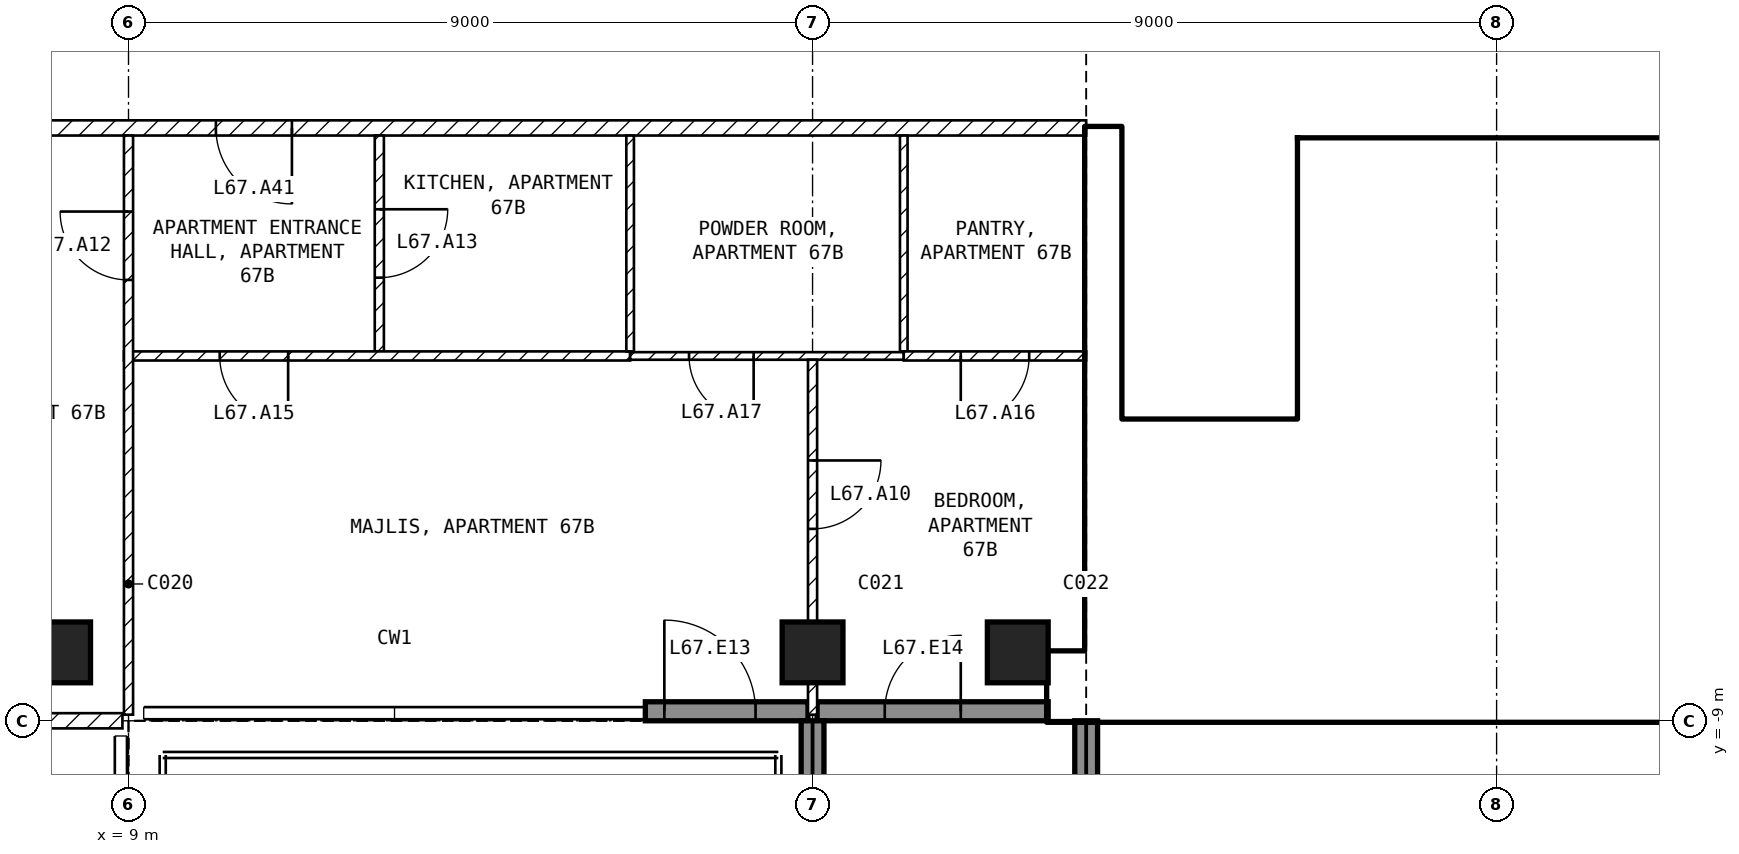
"""IFC4 building model, lengths in metres.
Left out: names, types, materials, properties, quantities, classifications, styles, units other than length and angle.
Written with IfcOpenShell. Run it as: python <this file> out.ifc"""

import sys

from ifc_helpers import new_model, si_unit, direction, frame, frame_2d, origin, origin_2d, place, context, subcontext, project, spatial, rectangle, extrude, element, fill, save


model = new_model("IFC4")
c1 = context("Model", 3, precision=1e-05, world=origin(), true_north=direction((0.0, 1.0)))
c2 = subcontext(c1, "Body", "Model", "MODEL_VIEW")
j1 = project(units=[si_unit("LENGTHUNIT", "METRE"), si_unit("PLANEANGLEUNIT", "RADIAN")], contexts=[c1])
p1 = place(None, origin())
s1 = spatial("IfcSite", under=j1, at=p1, CompositionType="ELEMENT")
p2 = place(p1, origin())
s2 = spatial("IfcBuilding", under=s1, at=p2, CompositionType="ELEMENT")
p3 = place(p2, frame((0.0, 0.0, 264.0)))
s3 = spatial("IfcBuildingStorey", under=s2, at=p3, CompositionType="ELEMENT", Elevation=264.0)
for number, where, z_axis, x_axis in (
    (1, (8.1, -8.1, -0.25), (0.0, 0.0, 1.0), (1.0, 0.0, 0.0)),
    (2, (18.0, -8.1, -0.25), (0.0, 0.0, 1.0), (1.0, 0.0, 0.0)),
    (3, (20.7, -8.1, -0.25), (0.0, 0.0, 1.0), (1.0, 0.0, 0.0)),
):
    element("IfcColumn", number, at=place(p3, frame(where, z_axis=z_axis, x_axis=x_axis)), inside=s3, PredefinedType="COLUMN", context=c2, shape_type="SweptSolid", body=[
        extrude(rectangle(XDim=0.8, YDim=0.8, at=origin_2d()), origin(), (0.0, 0.0, 1.0), 3.5),
    ])
p4 = place(p3, frame((15.8, -8.875, 0.0), z_axis=(0.0, 0.0, 1.0), x_axis=(1.0, 0.0, 0.0)))
e4 = element("IfcWall", 4, at=p4, inside=s3, PredefinedType="SOLIDWALL", context=c2, shape_type="SweptSolid", body=[
    extrude(rectangle(XDim=2.14, YDim=0.25, at=frame_2d((1.07, 0.0))), origin(), (0.0, 0.0, 1.0), 3.25),
])
p5 = place(p4, frame((0.25, 0.0, 0.0)))
e5 = element("IfcOpeningElement", 5, at=p5, cuts=e4, PredefinedType="OPENING", context=c2, shape_type="SweptSolid", body=[
    extrude(rectangle(XDim=1.2, YDim=2.4, at=frame_2d((0.6, 1.2))), frame((0.0, 0.135, 0.0), z_axis=(0.0, -1.0, 0.0), x_axis=(1.0, 0.0, 0.0)), (0.0, 0.0, 1.0), 0.27),
])
p6 = place(p3, frame((18.06, -8.875, 0.0), z_axis=(0.0, 0.0, 1.0), x_axis=(1.0, 0.0, 0.0)))
e6 = element("IfcWall", 6, at=p6, inside=s3, PredefinedType="SOLIDWALL", context=c2, shape_type="SweptSolid", body=[
    extrude(rectangle(XDim=3.04, YDim=0.25, at=frame_2d((1.52, 0.0))), origin(), (0.0, 0.0, 1.0), 3.25),
])
p7 = place(p6, frame((0.89, 0.0, 0.0)))
e7 = element("IfcOpeningElement", 7, at=p7, cuts=e6, PredefinedType="OPENING", context=c2, shape_type="SweptSolid", body=[
    extrude(rectangle(XDim=1.0, YDim=2.4, at=frame_2d((0.5, 1.2))), frame((0.0, 0.135, 0.0), z_axis=(0.0, -1.0, 0.0), x_axis=(1.0, 0.0, 0.0)), (0.0, 0.0, 1.0), 0.27),
])
p8 = place(p3, frame((18.0, -9.0, 0.0), z_axis=(0.0, 0.0, 1.0), x_axis=(0.0, -1.0, 0.0)))
e8 = element("IfcWall", 8, at=p8, inside=s3, PredefinedType="SOLIDWALL", context=c2, shape_type="SweptSolid", body=[
    extrude(rectangle(XDim=2.74, YDim=0.3, at=frame_2d((1.37, 0.0))), origin(), (0.0, 0.0, 1.0), 3.25),
])
p9 = place(p3, frame((21.6, -9.0, 0.0), z_axis=(0.0, 0.0, 1.0), x_axis=(0.0, -1.0, 0.0)))
e9 = element("IfcWall", 9, at=p9, inside=s3, PredefinedType="SOLIDWALL", context=c2, shape_type="SweptSolid", body=[
    extrude(rectangle(XDim=2.7, YDim=0.3, at=frame_2d((1.35, 0.0))), origin(), (0.0, 0.0, 1.0), 3.25),
])
p10 = place(p3, frame((21.1, -8.55, 0.0), z_axis=(0.0, 0.0, 1.0), x_axis=(1.0, 0.0, 0.0)))
e10 = element("IfcWall", 10, at=p10, inside=s3, PredefinedType="SHEAR", context=c2, shape_type="SweptSolid", body=[
    extrude(rectangle(XDim=9.1, YDim=0.9, at=frame_2d((4.55, 0.0))), origin(), (0.0, 0.0, 1.0), 3.25),
])
p11 = place(p3, frame((21.825, -8.1, 0.0), z_axis=(0.0, 0.0, 1.0), x_axis=(0.0, 1.0, 0.0)))
e11 = element("IfcWall", 11, at=p11, inside=s3, PredefinedType="SHEAR", context=c2, shape_type="SweptSolid", body=[
    extrude(rectangle(XDim=6.9, YDim=0.45, at=frame_2d((3.45, 0.0))), origin(), (0.0, 0.0, 1.0), 3.25),
])
p12 = place(p3, frame((24.5, -5.05, 0.0), z_axis=(0.0, 0.0, 1.0), x_axis=(0.0, 1.0, 0.0)))
e12 = element("IfcWall", 12, at=p12, inside=s3, PredefinedType="SOLIDWALL", context=c2, shape_type="SweptSolid", body=[
    extrude(rectangle(XDim=3.7, YDim=0.2, at=frame_2d((1.85, 0.0))), origin(), (0.0, 0.0, 1.0), 3.25),
])
p13 = place(p12, frame((0.1, 0.0, 0.0)))
e13 = element("IfcOpeningElement", 13, at=p13, cuts=e12, PredefinedType="OPENING", context=c2, shape_type="SweptSolid", body=[
    extrude(rectangle(XDim=0.8, YDim=2.1, at=frame_2d((0.4, 1.05))), frame((0.0, 0.11, 0.0), z_axis=(0.0, -1.0, 0.0), x_axis=(1.0, 0.0, 0.0)), (0.0, 0.0, 1.0), 0.22),
])
p14 = place(p3, frame((22.05, -5.15, 0.0), z_axis=(0.0, 0.0, 1.0), x_axis=(1.0, 0.0, 0.0)))
e14 = element("IfcWall", 14, at=p14, inside=s3, PredefinedType="SOLIDWALL", context=c2, shape_type="SweptSolid", body=[
    extrude(rectangle(XDim=6.3, YDim=0.2, at=frame_2d((3.15, 0.0))), origin(), (0.0, 0.0, 1.0), 3.25),
])
p15 = place(p14, frame((0.2, 0.0, 0.0)))
e15 = element("IfcOpeningElement", 15, at=p15, cuts=e14, PredefinedType="OPENING", context=c2, shape_type="SweptSolid", body=[
    extrude(rectangle(XDim=1.0, YDim=2.1, at=frame_2d((0.5, 1.05))), frame((0.0, 0.11, 0.0), z_axis=(0.0, -1.0, 0.0), x_axis=(1.0, 0.0, 0.0)), (0.0, 0.0, 1.0), 0.22),
])
p16 = place(p3, frame((28.25, -8.1, 0.0), z_axis=(0.0, 0.0, 1.0), x_axis=(0.0, 1.0, 0.0)))
e16 = element("IfcWall", 16, at=p16, inside=s3, PredefinedType="SOLIDWALL", context=c2, shape_type="SweptSolid", body=[
    extrude(rectangle(XDim=2.85, YDim=0.2, at=frame_2d((1.425, 0.0))), origin(), (0.0, 0.0, 1.0), 3.25),
])
p17 = place(p3, frame((24.6, -1.45, 0.0), z_axis=(0.0, 0.0, 1.0), x_axis=(1.0, 0.0, 0.0)))
e17 = element("IfcWall", 17, at=p17, inside=s3, PredefinedType="SOLIDWALL", context=c2, shape_type="SweptSolid", body=[
    extrude(rectangle(XDim=8.75, YDim=0.2, at=frame_2d((4.375, 0.0))), origin(), (0.0, 0.0, 1.0), 3.25),
])
p18 = place(p17, frame((0.4, 0.0, 0.0)))
e18 = element("IfcOpeningElement", 18, at=p18, cuts=e17, PredefinedType="OPENING", context=c2, shape_type="SweptSolid", body=[
    extrude(rectangle(XDim=1.0, YDim=2.1, at=frame_2d((0.5, 1.05))), frame((0.0, 0.11, 0.0), z_axis=(0.0, -1.0, 0.0), x_axis=(1.0, 0.0, 0.0)), (0.0, 0.0, 1.0), 0.22),
])
p19 = place(p17, frame((2.4, 0.0, 0.0)))
e19 = element("IfcOpeningElement", 19, at=p19, cuts=e17, PredefinedType="OPENING", context=c2, shape_type="SweptSolid", body=[
    extrude(rectangle(XDim=1.0, YDim=2.1, at=frame_2d((0.5, 1.05))), frame((0.0, 0.11, 0.0), z_axis=(0.0, -1.0, 0.0), x_axis=(1.0, 0.0, 0.0)), (0.0, 0.0, 1.0), 0.22),
])
p20 = place(p17, frame((4.4, 0.0, 0.0)))
e20 = element("IfcOpeningElement", 20, at=p20, cuts=e17, PredefinedType="OPENING", context=c2, shape_type="SweptSolid", body=[
    extrude(rectangle(XDim=1.0, YDim=2.1, at=frame_2d((0.5, 1.05))), frame((0.0, 0.11, 0.0), z_axis=(0.0, -1.0, 0.0), x_axis=(1.0, 0.0, 0.0)), (0.0, 0.0, 1.0), 0.22),
])
p21 = place(p17, frame((6.925, 0.0, 0.0)))
e21 = element("IfcOpeningElement", 21, at=p21, cuts=e17, PredefinedType="OPENING", context=c2, shape_type="SweptSolid", body=[
    extrude(rectangle(XDim=0.9, YDim=2.1, at=frame_2d((0.45, 1.05))), frame((0.0, 0.11, 0.0), z_axis=(0.0, -1.0, 0.0), x_axis=(1.0, 0.0, 0.0)), (0.0, 0.0, 1.0), 0.22),
])
p22 = place(p3, frame((24.6, -3.95, 0.0), z_axis=(0.0, 0.0, 1.0), x_axis=(1.0, 0.0, 0.0)))
e22 = element("IfcWall", 22, at=p22, inside=s3, PredefinedType="SOLIDWALL", context=c2, shape_type="SweptSolid", body=[
    extrude(rectangle(XDim=8.75, YDim=0.2, at=frame_2d((4.375, 0.0))), origin(), (0.0, 0.0, 1.0), 3.25),
])
for number, where, z_axis, x_axis in (
    (23, (26.5, -3.85, 0.0), (0.0, 0.0, 1.0), (0.0, 1.0, 0.0)),
    (24, (28.5, -3.85, 0.0), (0.0, 0.0, 1.0), (0.0, 1.0, 0.0)),
):
    element("IfcWall", number, at=place(p3, frame(where, z_axis=z_axis, x_axis=x_axis)), inside=s3, PredefinedType="SOLIDWALL", context=c2, shape_type="SweptSolid", body=[
        extrude(rectangle(XDim=2.3, YDim=0.2, at=frame_2d((1.15, 0.0))), origin(), (0.0, 0.0, 1.0), 3.25),
    ])
p23 = place(p3, frame((27.4, -5.05, 0.0), z_axis=(0.0, 0.0, 1.0), x_axis=(0.0, 1.0, 0.0)))
e25 = element("IfcWall", 25, at=p23, inside=s3, PredefinedType="PARTITIONING", context=c2, shape_type="SweptSolid", body=[
    extrude(rectangle(XDim=1.0, YDim=0.15, at=frame_2d((0.5, 0.0))), origin(), (0.0, 0.0, 1.0), 3.25),
])
p24 = place(p23, frame((0.1, 0.0, 0.0)))
e26 = element("IfcOpeningElement", 26, at=p24, cuts=e25, PredefinedType="OPENING", context=c2, shape_type="SweptSolid", body=[
    extrude(rectangle(XDim=0.8, YDim=2.1, at=frame_2d((0.4, 1.05))), frame((0.0, 0.085, 0.0), z_axis=(0.0, -1.0, 0.0), x_axis=(1.0, 0.0, 0.0)), (0.0, 0.0, 1.0), 0.17),
])
p25 = place(p3, frame((21.6, -1.2, 0.0), z_axis=(0.0, 0.0, 1.0), x_axis=(-1.0, 0.0, 0.0)))
e27 = element("IfcWall", 27, at=p25, inside=s3, PredefinedType="PARTITIONING", context=c2, shape_type="SweptSolid", body=[
    extrude(rectangle(XDim=17.2, YDim=0.2, at=frame_2d((8.6, 0.0))), origin(), (0.0, 0.0, 1.0), 3.25),
])
p26 = place(p25, frame((10.45, 0.0, 0.0)))
e28 = element("IfcOpeningElement", 28, at=p26, cuts=e27, PredefinedType="OPENING", context=c2, shape_type="SweptSolid", body=[
    extrude(rectangle(XDim=1.0, YDim=2.1, at=frame_2d((0.5, 1.05))), frame((0.0, 0.11, 0.0), z_axis=(0.0, -1.0, 0.0), x_axis=(1.0, 0.0, 0.0)), (0.0, 0.0, 1.0), 0.22),
])
p27 = place(p3, frame((8.92, -9.0, 0.0), z_axis=(0.0, 0.0, 1.0), x_axis=(-1.0, 0.0, 0.0)))
e29 = element("IfcWall", 29, at=p27, inside=s3, PredefinedType="PARTITIONING", context=c2, shape_type="SweptSolid", body=[
    extrude(rectangle(XDim=17.84, YDim=0.2, at=frame_2d((8.92, 0.0))), origin(), (0.0, 0.0, 1.0), 3.25),
])
p28 = place(p27, frame((8.42, 0.0, 0.0)))
e30 = element("IfcOpeningElement", 30, at=p28, cuts=e29, PredefinedType="OPENING", context=c2, shape_type="SweptSolid", body=[
    extrude(rectangle(XDim=1.0, YDim=2.1, at=frame_2d((0.5, 1.05))), frame((0.0, 0.11, 0.0), z_axis=(0.0, -1.0, 0.0), x_axis=(1.0, 0.0, 0.0)), (0.0, 0.0, 1.0), 0.22),
])
p29 = place(p3, frame((12.3, -1.3, 0.0), z_axis=(0.0, 0.0, 1.0), x_axis=(0.0, -1.0, 0.0)))
e31 = element("IfcWall", 31, at=p29, inside=s3, PredefinedType="PARTITIONING", context=c2, shape_type="SweptSolid", body=[
    extrude(rectangle(XDim=2.84, YDim=0.12, at=frame_2d((1.42, 0.0))), origin(), (0.0, 0.0, 1.0), 3.25),
])
p30 = place(p29, frame((0.97, 0.0, 0.0)))
e32 = element("IfcOpeningElement", 32, at=p30, cuts=e31, PredefinedType="OPENING", context=c2, shape_type="SweptSolid", body=[
    extrude(rectangle(XDim=0.9, YDim=2.1, at=frame_2d((0.45, 1.05))), frame((0.0, 0.07, 0.0), z_axis=(0.0, -1.0, 0.0), x_axis=(1.0, 0.0, 0.0)), (0.0, 0.0, 1.0), 0.14),
])
p31 = place(p3, frame((15.6, -4.2, 0.0), z_axis=(0.0, 0.0, 1.0), x_axis=(-1.0, 0.0, 0.0)))
e33 = element("IfcWall", 33, at=p31, inside=s3, PredefinedType="PARTITIONING", context=c2, shape_type="SweptSolid", body=[
    extrude(rectangle(XDim=6.66, YDim=0.12, at=frame_2d((3.33, 0.0))), origin(), (0.0, 0.0, 1.0), 3.25),
])
p32 = place(p31, frame((4.5, 0.0, 0.0)))
e34 = element("IfcOpeningElement", 34, at=p32, cuts=e33, PredefinedType="OPENING", context=c2, shape_type="SweptSolid", body=[
    extrude(rectangle(XDim=0.9, YDim=2.1, at=frame_2d((0.45, 1.05))), frame((0.0, 0.07, 0.0), z_axis=(0.0, -1.0, 0.0), x_axis=(1.0, 0.0, 0.0)), (0.0, 0.0, 1.0), 0.14),
])
p33 = place(p3, frame((9.0, -8.92, 0.0), z_axis=(0.0, 0.0, 1.0), x_axis=(0.0, 1.0, 0.0)))
e35 = element("IfcWall", 35, at=p33, inside=s3, PredefinedType="PARTITIONING", context=c2, shape_type="SweptSolid", body=[
    extrude(rectangle(XDim=7.62, YDim=0.12, at=frame_2d((3.81, 0.0))), origin(), (0.0, 0.0, 1.0), 3.25),
])
p34 = place(p33, frame((5.72, 0.0, 0.0)))
e36 = element("IfcOpeningElement", 36, at=p34, cuts=e35, PredefinedType="OPENING", context=c2, shape_type="SweptSolid", body=[
    extrude(rectangle(XDim=0.9, YDim=2.1, at=frame_2d((0.45, 1.05))), frame((0.0, 0.07, 0.0), z_axis=(0.0, -1.0, 0.0), x_axis=(1.0, 0.0, 0.0)), (0.0, 0.0, 1.0), 0.14),
])
for number, where, z_axis, x_axis in (
    (37, (15.6, -1.3, 0.0), (0.0, 0.0, 1.0), (0.0, -1.0, 0.0)),
    (38, (19.2, -1.3, 0.0), (0.0, 0.0, 1.0), (0.0, -1.0, 0.0)),
):
    element("IfcWall", number, at=place(p3, frame(where, z_axis=z_axis, x_axis=x_axis)), inside=s3, PredefinedType="PARTITIONING", context=c2, shape_type="SweptSolid", body=[
        extrude(rectangle(XDim=2.84, YDim=0.1, at=frame_2d((1.42, 0.0))), origin(), (0.0, 0.0, 1.0), 3.25),
    ])
p35 = place(p3, frame((19.2, -4.2, 0.0), z_axis=(0.0, 0.0, 1.0), x_axis=(-1.0, 0.0, 0.0)))
e39 = element("IfcWall", 39, at=p35, inside=s3, PredefinedType="PARTITIONING", context=c2, shape_type="SweptSolid", body=[
    extrude(rectangle(XDim=3.6, YDim=0.1, at=frame_2d((1.8, 0.0))), origin(), (0.0, 0.0, 1.0), 3.25),
])
p36 = place(p35, frame((1.975, 0.0, 0.0)))
e40 = element("IfcOpeningElement", 40, at=p36, cuts=e39, PredefinedType="OPENING", context=c2, shape_type="SweptSolid", body=[
    extrude(rectangle(XDim=0.85, YDim=2.1, at=frame_2d((0.425, 1.05))), frame((0.0, 0.06, 0.0), z_axis=(0.0, -1.0, 0.0), x_axis=(1.0, 0.0, 0.0)), (0.0, 0.0, 1.0), 0.12),
])
p37 = place(p3, frame((21.6, -4.2, 0.0), z_axis=(0.0, 0.0, 1.0), x_axis=(-1.0, 0.0, 0.0)))
e41 = element("IfcWall", 41, at=p37, inside=s3, PredefinedType="PARTITIONING", context=c2, shape_type="SweptSolid", body=[
    extrude(rectangle(XDim=2.4, YDim=0.12, at=frame_2d((1.2, 0.0))), origin(), (0.0, 0.0, 1.0), 3.25),
])
p38 = place(p37, frame((0.75, 0.0, 0.0)))
e42 = element("IfcOpeningElement", 42, at=p38, cuts=e41, PredefinedType="OPENING", context=c2, shape_type="SweptSolid", body=[
    extrude(rectangle(XDim=0.9, YDim=2.1, at=frame_2d((0.45, 1.05))), frame((0.0, 0.07, 0.0), z_axis=(0.0, -1.0, 0.0), x_axis=(1.0, 0.0, 0.0)), (0.0, 0.0, 1.0), 0.14),
])
p39 = place(p3, frame((18.0, -4.25, 0.0), z_axis=(0.0, 0.0, 1.0), x_axis=(0.0, -1.0, 0.0)))
e43 = element("IfcWall", 43, at=p39, inside=s3, PredefinedType="PARTITIONING", context=c2, shape_type="SweptSolid", body=[
    extrude(rectangle(XDim=4.67, YDim=0.12, at=frame_2d((2.335, 0.0))), origin(), (0.0, 0.0, 1.0), 2.496),
])
p40 = place(p39, frame((1.325, 0.0, 0.0)))
e44 = element("IfcOpeningElement", 44, at=p40, cuts=e43, PredefinedType="OPENING", context=c2, shape_type="SweptSolid", body=[
    extrude(rectangle(XDim=0.9, YDim=2.1, at=frame_2d((0.45, 1.05))), frame((0.0, 0.07, 0.0), z_axis=(0.0, -1.0, 0.0), x_axis=(1.0, 0.0, 0.0)), (0.0, 0.0, 1.0), 0.14),
])
p41 = place(p5, origin())
e45 = element("IfcDoor", 45, at=p41, inside=s3, OperationType="SINGLE_SWING_LEFT", PredefinedType="DOOR", context=c2, shape_type="SweptSolid", body=[
    extrude(rectangle(XDim=1.2, YDim=2.4, at=frame_2d((0.6, 1.2))), frame((0.0, 0.025, 0.0), z_axis=(0.0, -1.0, 0.0), x_axis=(1.0, 0.0, 0.0)), (0.0, 0.0, 1.0), 0.05),
])
fill(e5, e45)
p42 = place(p7, origin())
e46 = element("IfcDoor", 46, at=p42, inside=s3, OperationType="SINGLE_SWING_RIGHT", PredefinedType="DOOR", context=c2, shape_type="SweptSolid", body=[
    extrude(rectangle(XDim=1.0, YDim=2.4, at=frame_2d((0.5, 1.2))), frame((0.0, 0.025, 0.0), z_axis=(0.0, -1.0, 0.0), x_axis=(1.0, 0.0, 0.0)), (0.0, 0.0, 1.0), 0.05),
])
fill(e7, e46)
p43 = place(p18, origin())
e47 = element("IfcDoor", 47, at=p43, inside=s3, OperationType="DOUBLE_DOOR_SLIDING", PredefinedType="DOOR", context=c2, shape_type="SweptSolid", body=[
    extrude(rectangle(XDim=1.0, YDim=2.1, at=frame_2d((0.5, 1.05))), frame((0.0, 0.025, 0.0), z_axis=(0.0, -1.0, 0.0), x_axis=(1.0, 0.0, 0.0)), (0.0, 0.0, 1.0), 0.05),
])
fill(e18, e47)
p44 = place(p19, origin())
e48 = element("IfcDoor", 48, at=p44, inside=s3, OperationType="DOUBLE_DOOR_SLIDING", PredefinedType="DOOR", context=c2, shape_type="SweptSolid", body=[
    extrude(rectangle(XDim=1.0, YDim=2.1, at=frame_2d((0.5, 1.05))), frame((0.0, 0.025, 0.0), z_axis=(0.0, -1.0, 0.0), x_axis=(1.0, 0.0, 0.0)), (0.0, 0.0, 1.0), 0.05),
])
fill(e19, e48)
p45 = place(p20, origin())
e49 = element("IfcDoor", 49, at=p45, inside=s3, OperationType="DOUBLE_DOOR_SLIDING", PredefinedType="DOOR", context=c2, shape_type="SweptSolid", body=[
    extrude(rectangle(XDim=1.0, YDim=2.1, at=frame_2d((0.5, 1.05))), frame((0.0, 0.025, 0.0), z_axis=(0.0, -1.0, 0.0), x_axis=(1.0, 0.0, 0.0)), (0.0, 0.0, 1.0), 0.05),
])
fill(e20, e49)
p46 = place(p15, origin())
e50 = element("IfcDoor", 50, at=p46, inside=s3, OperationType="SINGLE_SWING_LEFT", PredefinedType="DOOR", context=c2, shape_type="SweptSolid", body=[
    extrude(rectangle(XDim=1.0, YDim=2.1, at=frame_2d((0.5, 1.05))), frame((0.0, 0.025, 0.0), z_axis=(0.0, -1.0, 0.0), x_axis=(1.0, 0.0, 0.0)), (0.0, 0.0, 1.0), 0.05),
])
fill(e15, e50)
p47 = place(p13, origin())
e51 = element("IfcDoor", 51, at=p47, inside=s3, OperationType="SINGLE_SWING_LEFT", PredefinedType="DOOR", context=c2, shape_type="SweptSolid", body=[
    extrude(rectangle(XDim=0.8, YDim=2.1, at=frame_2d((0.4, 1.05))), frame((0.0, 0.025, 0.0), z_axis=(0.0, -1.0, 0.0), x_axis=(1.0, 0.0, 0.0)), (0.0, 0.0, 1.0), 0.05),
])
fill(e13, e51)
p48 = place(p24, origin())
e52 = element("IfcDoor", 52, at=p48, inside=s3, OperationType="SINGLE_SWING_LEFT", PredefinedType="DOOR", context=c2, shape_type="SweptSolid", body=[
    extrude(rectangle(XDim=0.8, YDim=2.1, at=frame_2d((0.4, 1.05))), frame((0.0, 0.025, 0.0), z_axis=(0.0, -1.0, 0.0), x_axis=(1.0, 0.0, 0.0)), (0.0, 0.0, 1.0), 0.05),
])
fill(e26, e52)
p49 = place(p40, origin())
e53 = element("IfcDoor", 53, at=p49, inside=s3, OperationType="SINGLE_SWING_LEFT", PredefinedType="DOOR", context=c2, shape_type="SweptSolid", body=[
    extrude(rectangle(XDim=0.9, YDim=2.1, at=frame_2d((0.45, 1.05))), frame((0.0, 0.025, 0.0), z_axis=(0.0, -1.0, 0.0), x_axis=(1.0, 0.0, 0.0)), (0.0, 0.0, 1.0), 0.05),
])
fill(e44, e53)
p50 = place(p34, origin())
e54 = element("IfcDoor", 54, at=p50, inside=s3, OperationType="SINGLE_SWING_RIGHT", PredefinedType="DOOR", context=c2, shape_type="SweptSolid", body=[
    extrude(rectangle(XDim=0.9, YDim=2.1, at=frame_2d((0.45, 1.05))), frame((0.0, 0.025, 0.0), z_axis=(0.0, -1.0, 0.0), x_axis=(1.0, 0.0, 0.0)), (0.0, 0.0, 1.0), 0.05),
])
fill(e36, e54)
p51 = place(p30, origin())
e55 = element("IfcDoor", 55, at=p51, inside=s3, OperationType="SINGLE_SWING_LEFT", PredefinedType="DOOR", context=c2, shape_type="SweptSolid", body=[
    extrude(rectangle(XDim=0.9, YDim=2.1, at=frame_2d((0.45, 1.05))), frame((0.0, 0.025, 0.0), z_axis=(0.0, -1.0, 0.0), x_axis=(1.0, 0.0, 0.0)), (0.0, 0.0, 1.0), 0.05),
])
fill(e32, e55)
p52 = place(p32, origin())
e56 = element("IfcDoor", 56, at=p52, inside=s3, OperationType="SINGLE_SWING_LEFT", PredefinedType="DOOR", context=c2, shape_type="SweptSolid", body=[
    extrude(rectangle(XDim=0.9, YDim=2.1, at=frame_2d((0.45, 1.05))), frame((0.0, 0.025, 0.0), z_axis=(0.0, -1.0, 0.0), x_axis=(1.0, 0.0, 0.0)), (0.0, 0.0, 1.0), 0.05),
])
fill(e34, e56)
p53 = place(p38, origin())
e57 = element("IfcDoor", 57, at=p53, inside=s3, OperationType="SINGLE_SWING_RIGHT", PredefinedType="DOOR", context=c2, shape_type="SweptSolid", body=[
    extrude(rectangle(XDim=0.9, YDim=2.1, at=frame_2d((0.45, 1.05))), frame((0.0, 0.025, 0.0), z_axis=(0.0, -1.0, 0.0), x_axis=(1.0, 0.0, 0.0)), (0.0, 0.0, 1.0), 0.05),
])
fill(e42, e57)
p54 = place(p36, origin())
e58 = element("IfcDoor", 58, at=p54, inside=s3, OperationType="SINGLE_SWING_LEFT", PredefinedType="DOOR", context=c2, shape_type="SweptSolid", body=[
    extrude(rectangle(XDim=0.85, YDim=2.1, at=frame_2d((0.425, 1.05))), frame((0.0, 0.025, 0.0), z_axis=(0.0, -1.0, 0.0), x_axis=(1.0, 0.0, 0.0)), (0.0, 0.0, 1.0), 0.05),
])
fill(e40, e58)
p55 = place(p26, origin())
e59 = element("IfcDoor", 59, at=p55, inside=s3, OperationType="SINGLE_SWING_LEFT", PredefinedType="DOOR", context=c2, shape_type="SweptSolid", body=[
    extrude(rectangle(XDim=1.0, YDim=2.1, at=frame_2d((0.5, 1.05))), frame((0.0, 0.025, 0.0), z_axis=(0.0, -1.0, 0.0), x_axis=(1.0, 0.0, 0.0)), (0.0, 0.0, 1.0), 0.05),
])
fill(e28, e59)
save(model, sys.argv[1])
